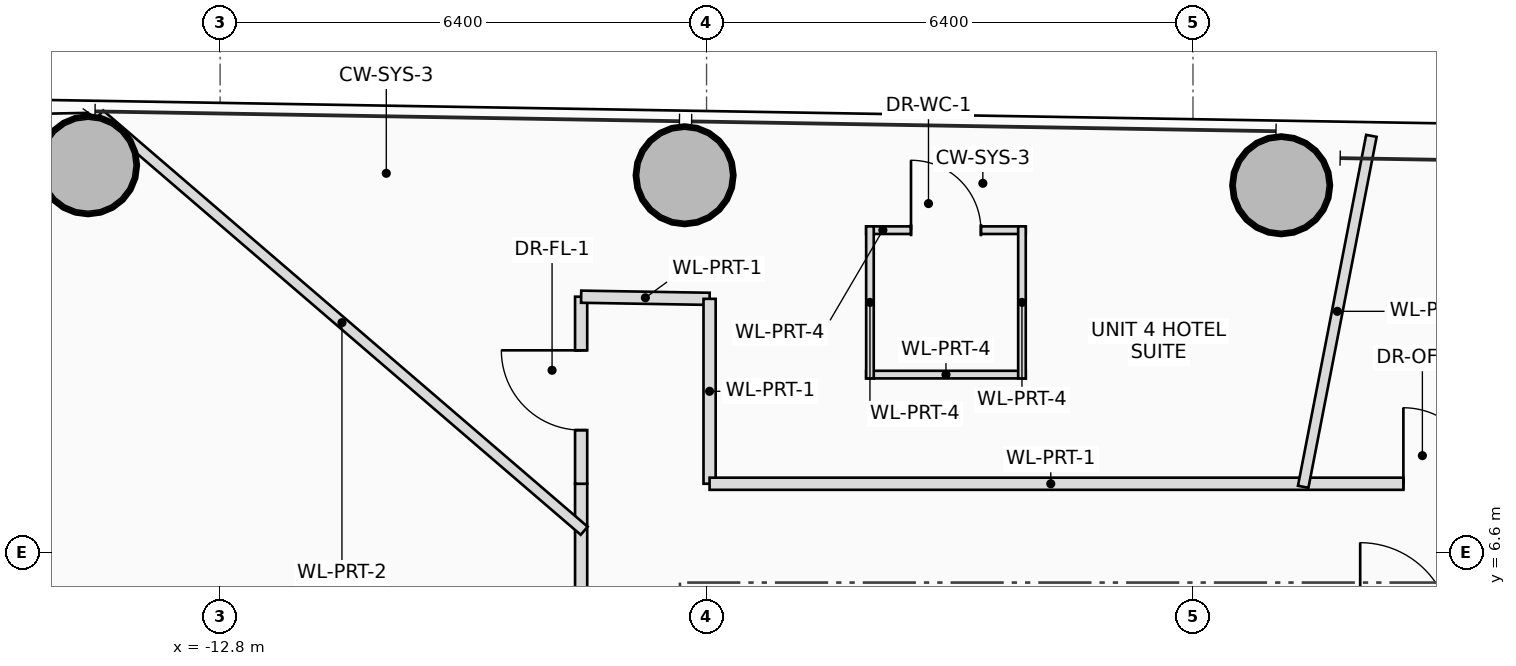
"""IFC4 building model, lengths in metres.
Left out: names, types, materials, properties, quantities, classifications, styles, units other than length and angle.
Written with IfcOpenShell. Run it as: python <this file> out.ifc"""

import sys

from ifc_helpers import new_model, si_unit, direction, frame, frame_2d, origin, origin_2d, place, context, subcontext, project, spatial, rectangle, hollow_circle, extrude, source, transform, mapped, element, fill, save


model = new_model("IFC4")
c1 = context("Model", 3, precision=1e-05, world=origin(), true_north=direction((0.0, 1.0)))
c2 = subcontext(c1, "Body", "Model", "MODEL_VIEW")
j1 = project(units=[si_unit("LENGTHUNIT", "METRE"), si_unit("PLANEANGLEUNIT", "RADIAN")], contexts=[c1])
p1 = place(None, origin())
s1 = spatial("IfcSite", under=j1, at=p1, CompositionType="ELEMENT")
p2 = place(p1, origin())
s2 = spatial("IfcBuilding", under=s1, at=p2, CompositionType="ELEMENT")
p3 = place(p2, frame((0.0, 0.0, 146.75)))
s3 = spatial("IfcBuildingStorey", under=s2, at=p3, CompositionType="ELEMENT", Elevation=146.75)
m1 = source(origin(), c2, "Body", "SweptSolid", [
    extrude(hollow_circle(Radius=0.65, WallThickness=0.045, at=origin_2d()), origin(), (0.0, 0.0, 1.0), 3.45),
])
for number, where, z_axis, x_axis in (
    (1, (1.16, 11.427, 0.0), (0.0, 0.0, 1.0), (1.0, 0.0, 0.0)),
    (2, (-6.688, 11.558, 0.0), (0.0, 0.0, 1.0), (1.0, 0.0, 0.0)),
    (3, (-14.538, 11.69, 0.0), (0.0, 0.0, 1.0), (1.0, 0.0, 0.0)),
):
    element("IfcColumn", number, at=place(p3, frame(where, z_axis=z_axis, x_axis=x_axis)), inside=s3, PredefinedType="COLUMN", context=c2, shape_type="MappedRepresentation", body=[
        mapped(m1, transform((0.0, 0.0, 0.0), scale=1.0)),
    ])
p4 = place(p3, frame((-4.3, 10.836, 0.0), z_axis=(0.0, 0.0, 1.0), x_axis=(1.0, 0.0, 0.0)))
e4 = element("IfcWall", 4, at=p4, inside=s3, PredefinedType="PARTITIONING", context=c2, shape_type="SweptSolid", body=[
    extrude(rectangle(XDim=2.1, YDim=0.1, at=frame_2d((1.05, 0.0))), origin(), (0.0, 0.0, 1.0), 3.25),
])
p5 = place(p4, frame((0.59, 0.0, 0.0)))
e5 = element("IfcOpeningElement", 5, at=p5, cuts=e4, PredefinedType="OPENING", context=c2, shape_type="SweptSolid", body=[
    extrude(rectangle(XDim=0.92, YDim=2.1, at=frame_2d((0.46, 1.05))), frame((0.0, 0.06, 0.0), z_axis=(0.0, -1.0, 0.0), x_axis=(1.0, 0.0, 0.0)), (0.0, 0.0, 1.0), 0.12),
])
p6 = place(p3, frame((-2.2, 8.936, 0.0), z_axis=(0.0, 0.0, 1.0), x_axis=(-1.0, 0.0, 0.0)))
e6 = element("IfcWall", 6, at=p6, inside=s3, PredefinedType="PARTITIONING", context=c2, shape_type="SweptSolid", body=[
    extrude(rectangle(XDim=2.1, YDim=0.1, at=frame_2d((1.05, 0.0))), origin(), (0.0, 0.0, 1.0), 3.25),
])
for number, where, z_axis, x_axis in (
    (7, (-2.25, 10.886, 0.0), (0.0, 0.0, 1.0), (0.0, -1.0, 0.0)),
    (8, (-4.25, 8.886, 0.0), (0.0, 0.0, 1.0), (0.0, 1.0, 0.0)),
):
    element("IfcWall", number, at=place(p3, frame(where, z_axis=z_axis, x_axis=x_axis)), inside=s3, PredefinedType="PARTITIONING", context=c2, shape_type="SweptSolid", body=[
        extrude(rectangle(XDim=2.0, YDim=0.1, at=frame_2d((1.0, 0.0))), origin(), (0.0, 0.0, 1.0), 2.905),
    ])
p7 = place(p3, frame((-8.05, -7.5, 0.0), z_axis=(0.0, 0.0, 1.0), x_axis=(0.0, 1.0, 0.0)))
e9 = element("IfcWall", 9, at=p7, inside=s3, PredefinedType="PARTITIONING", context=c2, shape_type="SweptSolid", body=[
    extrude(rectangle(XDim=15.0, YDim=0.16, at=frame_2d((7.5, 0.0))), origin(), (0.0, 0.0, 1.0), 2.605),
])
p8 = place(p7, frame((7.0, 0.0, 0.0)))
e10 = element("IfcOpeningElement", 10, at=p8, cuts=e9, PredefinedType="OPENING", context=c2, shape_type="SweptSolid", body=[
    extrude(rectangle(XDim=1.0, YDim=2.25, at=frame_2d((0.5, 1.125))), frame((0.0, 0.09, 0.0), z_axis=(0.0, -1.0, 0.0), x_axis=(1.0, 0.0, 0.0)), (0.0, 0.0, 1.0), 0.18),
])
p9 = place(p3, frame((-8.05, 7.5, 0.0), z_axis=(0.0, 0.0, 1.0), x_axis=(0.0, 1.0, 0.0)))
e11 = element("IfcWall", 11, at=p9, inside=s3, PredefinedType="PARTITIONING", context=c2, shape_type="SweptSolid", body=[
    extrude(rectangle(XDim=2.461, YDim=0.16, at=frame_2d((1.23, 0.0))), origin(), (0.0, 0.0, 1.0), 2.805),
])
p10 = place(p9, frame((0.706, 0.0, 0.0)))
e12 = element("IfcOpeningElement", 12, at=p10, cuts=e11, PredefinedType="OPENING", context=c2, shape_type="SweptSolid", body=[
    extrude(rectangle(XDim=1.05, YDim=2.2, at=frame_2d((0.525, 1.1))), frame((0.0, 0.09, 0.0), z_axis=(0.0, -1.0, 0.0), x_axis=(1.0, 0.0, 0.0)), (0.0, 0.0, 1.0), 0.18),
])
p11 = place(p3, frame((-8.05, 9.961, 0.0), z_axis=(0.0, 0.0, 1.0), x_axis=(0.999859611566, -0.016755809729, 0.0)))
e13 = element("IfcWall", 13, at=p11, inside=s3, PredefinedType="PARTITIONING", context=c2, shape_type="SweptSolid", body=[
    extrude(rectangle(XDim=1.69, YDim=0.16, at=frame_2d((0.845, 0.0))), origin(), (0.0, 0.0, 1.0), 2.605),
])
p12 = place(p3, frame((-6.36, 9.933, 0.0), z_axis=(0.0, 0.0, 1.0), x_axis=(0.0, -1.0, 0.0)))
e14 = element("IfcWall", 14, at=p12, inside=s3, PredefinedType="PARTITIONING", context=c2, shape_type="SweptSolid", body=[
    extrude(rectangle(XDim=2.433, YDim=0.16, at=frame_2d((1.216, 0.0))), origin(), (0.0, 0.0, 1.0), 2.605),
])
p13 = place(p3, frame((-6.36, 7.5, 0.0), z_axis=(0.0, 0.0, 1.0), x_axis=(1.0, 0.0, 0.0)))
e15 = element("IfcWall", 15, at=p13, inside=s3, PredefinedType="PARTITIONING", context=c2, shape_type="SweptSolid", body=[
    extrude(rectangle(XDim=11.61, YDim=0.16, at=frame_2d((5.805, 0.0))), origin(), (0.0, 0.0, 1.0), 2.605),
])
p14 = place(p13, frame((9.128, 0.0, 0.0)))
e16 = element("IfcOpeningElement", 16, at=p14, cuts=e15, PredefinedType="OPENING", context=c2, shape_type="SweptSolid", body=[
    extrude(rectangle(XDim=1.0, YDim=2.25, at=frame_2d((0.5, 1.125))), frame((0.0, 0.09, 0.0), z_axis=(0.0, -1.0, 0.0), x_axis=(1.0, 0.0, 0.0)), (0.0, 0.0, 1.0), 0.18),
])
p15 = place(p3, frame((1.45, 7.46, 0.0), z_axis=(0.0, 0.0, 1.0), x_axis=(0.190762676882, 0.981636185717, 0.0)))
e17 = element("IfcWall", 17, at=p15, inside=s3, PredefinedType="PARTITIONING", context=c2, shape_type="SweptSolid", body=[
    extrude(rectangle(XDim=4.703, YDim=0.14, at=frame_2d((2.352, 0.0))), origin(), (0.0, 0.0, 1.0), 2.605),
])
p16 = place(p3, frame((-8.01, 6.882, 0.0), z_axis=(0.0, 0.0, 1.0), x_axis=(-0.758515743862, 0.651654714026, 0.0)))
e18 = element("IfcWall", 18, at=p16, inside=s3, PredefinedType="PARTITIONING", context=c2, shape_type="SweptSolid", body=[
    extrude(rectangle(XDim=8.403, YDim=0.14, at=frame_2d((4.202, 0.0))), origin(), (0.0, 0.0, 1.0), 2.605),
])
p17 = place(p5, origin())
e19 = element("IfcDoor", 19, at=p17, inside=s3, OperationType="SINGLE_SWING_LEFT", PredefinedType="DOOR", context=c2, shape_type="SweptSolid", body=[
    extrude(rectangle(XDim=0.92, YDim=2.1, at=frame_2d((0.46, 1.05))), frame((0.0, 0.025, 0.0), z_axis=(0.0, -1.0, 0.0), x_axis=(1.0, 0.0, 0.0)), (0.0, 0.0, 1.0), 0.05),
])
fill(e5, e19)
p18 = place(p10, origin())
e20 = element("IfcDoor", 20, at=p18, inside=s3, OperationType="SINGLE_SWING_RIGHT", PredefinedType="DOOR", context=c2, shape_type="SweptSolid", body=[
    extrude(rectangle(XDim=1.05, YDim=2.2, at=frame_2d((0.525, 1.1))), frame((0.0, 0.025, 0.0), z_axis=(0.0, -1.0, 0.0), x_axis=(1.0, 0.0, 0.0)), (0.0, 0.0, 1.0), 0.05),
])
fill(e12, e20)
p19 = place(p14, origin())
e21 = element("IfcDoor", 21, at=p19, inside=s3, OperationType="SINGLE_SWING_LEFT", PredefinedType="DOOR", context=c2, shape_type="SweptSolid", body=[
    extrude(rectangle(XDim=1.0, YDim=2.25, at=frame_2d((0.5, 1.125))), frame((0.0, 0.025, 0.0), z_axis=(0.0, -1.0, 0.0), x_axis=(1.0, 0.0, 0.0)), (0.0, 0.0, 1.0), 0.05),
])
fill(e16, e21)
save(model, sys.argv[1])
